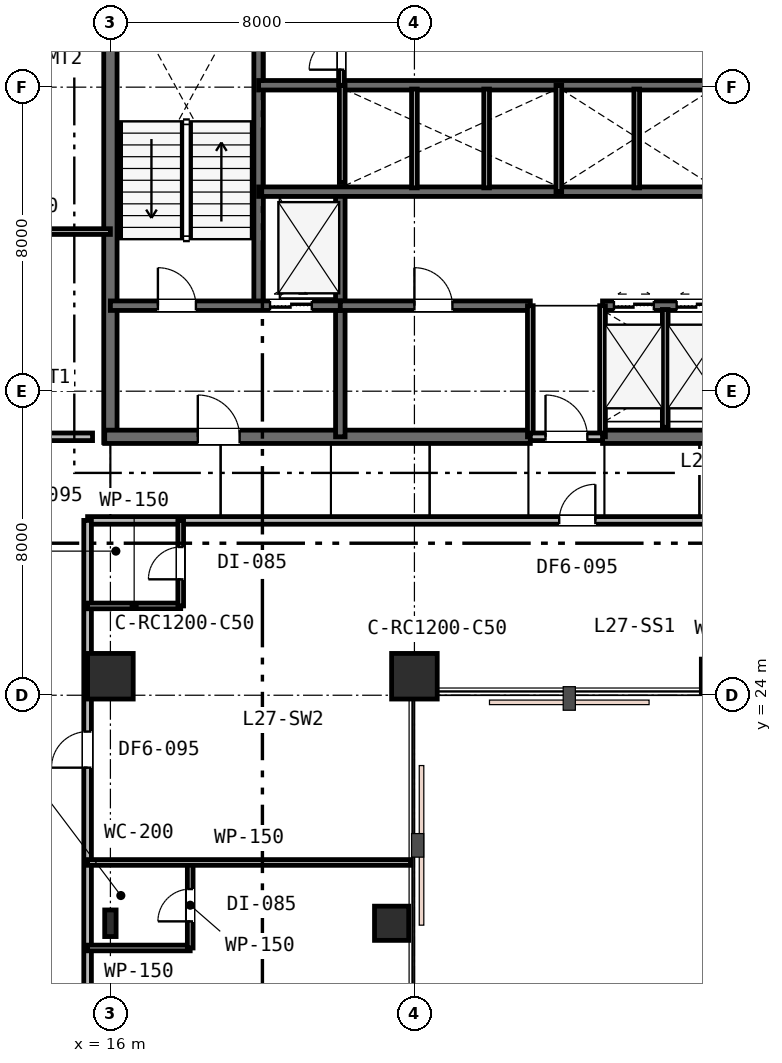
"""IFC4 building model, lengths in metres.
Left out: names, types, materials, properties, quantities, classifications, styles, units other than length and angle.
Written with IfcOpenShell. Run it as: python <this file> out.ifc"""

import sys

from ifc_helpers import new_model, si_unit, direction, frame, frame_2d, origin, origin_2d, place, context, subcontext, project, spatial, rectangle, i_section, extrude, element, fill, save


model = new_model("IFC4")
c1 = context("Model", 3, precision=1e-05, world=origin(), true_north=direction((0.0, 1.0)))
c2 = subcontext(c1, "Body", "Model", "MODEL_VIEW")
j1 = project(units=[si_unit("LENGTHUNIT", "METRE"), si_unit("PLANEANGLEUNIT", "RADIAN")], contexts=[c1])
p1 = place(None, origin())
s1 = spatial("IfcSite", under=j1, at=p1, CompositionType="ELEMENT")
p2 = place(p1, origin())
s2 = spatial("IfcBuilding", under=s1, at=p2, CompositionType="ELEMENT")
p3 = place(p2, frame((0.0, 0.0, 108.0)))
s3 = spatial("IfcBuildingStorey", under=s2, at=p3, CompositionType="ELEMENT", Elevation=108.0)
p4 = place(p3, frame((16.0, 30.65, 0.0), z_axis=(0.0, 0.0, 1.0), x_axis=(0.0, 1.0, 0.0)))
e1 = element("IfcWall", 1, at=p4, inside=s3, PredefinedType="SHEAR", context=c2, shape_type="SweptSolid", body=[
    extrude(rectangle(XDim=12.3, YDim=0.35, at=frame_2d((6.15, 0.0))), origin(), (0.0, 0.0, 1.0), 3.6),
])
p5 = place(p3, frame((15.85, 30.8, 0.0), z_axis=(0.0, 0.0, 1.0), x_axis=(1.0, 0.0, 0.0)))
e2 = element("IfcWall", 2, at=p5, inside=s3, PredefinedType="SHEAR", context=c2, shape_type="SweptSolid", body=[
    extrude(rectangle(XDim=11.2, YDim=0.35, at=frame_2d((5.6, 0.0))), origin(), (0.0, 0.0, 1.0), 3.6),
])
p6 = place(p5, frame((2.45, 0.0, 0.0)))
e3 = element("IfcOpeningElement", 3, at=p6, cuts=e2, PredefinedType="OPENING", context=c2, shape_type="SweptSolid", body=[
    extrude(rectangle(XDim=1.1, YDim=2.15, at=frame_2d((0.55, 1.075))), frame((0.0, 0.185, 0.0), z_axis=(0.0, -1.0, 0.0), x_axis=(1.0, 0.0, 0.0)), (0.0, 0.0, 1.0), 0.37),
])
p7 = place(p3, frame((28.95, 30.8, 0.0), z_axis=(0.0, 0.0, 1.0), x_axis=(1.0, 0.0, 0.0)))
e4 = element("IfcWall", 4, at=p7, inside=s3, PredefinedType="SHEAR", context=c2, shape_type="SweptSolid", body=[
    extrude(rectangle(XDim=11.2, YDim=0.35, at=frame_2d((5.6, 0.0))), origin(), (0.0, 0.0, 1.0), 3.6),
])
p8 = place(p7, frame((7.65, 0.0, 0.0)))
e5 = element("IfcOpeningElement", 5, at=p8, cuts=e4, PredefinedType="OPENING", context=c2, shape_type="SweptSolid", body=[
    extrude(rectangle(XDim=1.1, YDim=2.15, at=frame_2d((0.55, 1.075))), frame((0.0, 0.185, 0.0), z_axis=(0.0, -1.0, 0.0), x_axis=(1.0, 0.0, 0.0)), (0.0, 0.0, 1.0), 0.37),
])
p9 = place(p3, frame((19.9, 34.25, 0.0), z_axis=(0.0, 0.0, 1.0), x_axis=(0.0, 1.0, 0.0)))
e6 = element("IfcWall", 6, at=p9, inside=s3, PredefinedType="SHEAR", context=c2, shape_type="SweptSolid", body=[
    extrude(rectangle(XDim=8.65, YDim=0.25, at=frame_2d((4.325, 0.0))), origin(), (0.0, 0.0, 1.0), 3.6),
])
p10 = place(p3, frame((22.05, 30.8, 0.0), z_axis=(0.0, 0.0, 1.0), x_axis=(0.0, 1.0, 0.0)))
e7 = element("IfcWall", 7, at=p10, inside=s3, PredefinedType="SHEAR", context=c2, shape_type="SweptSolid", body=[
    extrude(rectangle(XDim=6.45, YDim=0.25, at=frame_2d((3.225, 0.0))), origin(), (0.0, 0.0, 1.0), 3.6),
])
p11 = place(p3, frame((16.0, 34.25, 0.0), z_axis=(0.0, 0.0, 1.0), x_axis=(1.0, 0.0, 0.0)))
e8 = element("IfcWall", 8, at=p11, inside=s3, PredefinedType="SHEAR", context=c2, shape_type="SweptSolid", body=[
    extrude(rectangle(XDim=6.05, YDim=0.25, at=frame_2d((3.025, 0.0))), origin(), (0.0, 0.0, 1.0), 3.6),
])
p12 = place(p11, frame((1.25, 0.0, 0.0)))
e9 = element("IfcOpeningElement", 9, at=p12, cuts=e8, PredefinedType="OPENING", context=c2, shape_type="SweptSolid", body=[
    extrude(rectangle(XDim=1.0, YDim=2.15, at=frame_2d((0.5, 1.075))), frame((0.0, 0.135, 0.0), z_axis=(0.0, -1.0, 0.0), x_axis=(1.0, 0.0, 0.0)), (0.0, 0.0, 1.0), 0.27),
])
p13 = place(p11, frame((4.2, 0.0, 0.0)))
e10 = element("IfcOpeningElement", 10, at=p13, cuts=e8, PredefinedType="OPENING", context=c2, shape_type="SweptSolid", body=[
    extrude(rectangle(XDim=1.1, YDim=2.15, at=frame_2d((0.55, 1.075))), frame((0.0, 0.135, 0.0), z_axis=(0.0, -1.0, 0.0), x_axis=(1.0, 0.0, 0.0)), (0.0, 0.0, 1.0), 0.27),
])
p14 = place(p3, frame((22.05, 34.25, 0.0), z_axis=(0.0, 0.0, 1.0), x_axis=(1.0, 0.0, 0.0)))
e11 = element("IfcWall", 11, at=p14, inside=s3, PredefinedType="SHEAR", context=c2, shape_type="SweptSolid", body=[
    extrude(rectangle(XDim=5.0, YDim=0.25, at=frame_2d((2.5, 0.0))), origin(), (0.0, 0.0, 1.0), 3.6),
])
p15 = place(p14, frame((1.95, 0.0, 0.0)))
e12 = element("IfcOpeningElement", 12, at=p15, cuts=e11, PredefinedType="OPENING", context=c2, shape_type="SweptSolid", body=[
    extrude(rectangle(XDim=1.0, YDim=2.15, at=frame_2d((0.5, 1.075))), frame((0.0, 0.135, 0.0), z_axis=(0.0, -1.0, 0.0), x_axis=(1.0, 0.0, 0.0)), (0.0, 0.0, 1.0), 0.27),
])
p16 = place(p3, frame((28.95, 34.25, 0.0), z_axis=(0.0, 0.0, 1.0), x_axis=(1.0, 0.0, 0.0)))
e13 = element("IfcWall", 13, at=p16, inside=s3, PredefinedType="SHEAR", context=c2, shape_type="SweptSolid", body=[
    extrude(rectangle(XDim=5.0, YDim=0.25, at=frame_2d((2.5, 0.0))), origin(), (0.0, 0.0, 1.0), 3.6),
])
p17 = place(p16, frame((0.3, 0.0, 0.0)))
e14 = element("IfcOpeningElement", 14, at=p17, cuts=e13, PredefinedType="OPENING", context=c2, shape_type="SweptSolid", body=[
    extrude(rectangle(XDim=1.05, YDim=2.15, at=frame_2d((0.525, 1.075))), frame((0.0, 0.135, 0.0), z_axis=(0.0, -1.0, 0.0), x_axis=(1.0, 0.0, 0.0)), (0.0, 0.0, 1.0), 0.27),
])
p18 = place(p16, frame((1.95, 0.0, 0.0)))
e15 = element("IfcOpeningElement", 15, at=p18, cuts=e13, PredefinedType="OPENING", context=c2, shape_type="SweptSolid", body=[
    extrude(rectangle(XDim=1.05, YDim=2.15, at=frame_2d((0.525, 1.075))), frame((0.0, 0.135, 0.0), z_axis=(0.0, -1.0, 0.0), x_axis=(1.0, 0.0, 0.0)), (0.0, 0.0, 1.0), 0.27),
])
p19 = place(p16, frame((3.6, 0.0, 0.0)))
e16 = element("IfcOpeningElement", 16, at=p19, cuts=e13, PredefinedType="OPENING", context=c2, shape_type="SweptSolid", body=[
    extrude(rectangle(XDim=1.05, YDim=2.15, at=frame_2d((0.525, 1.075))), frame((0.0, 0.135, 0.0), z_axis=(0.0, -1.0, 0.0), x_axis=(1.0, 0.0, 0.0)), (0.0, 0.0, 1.0), 0.27),
])
p20 = place(p3, frame((19.9, 37.25, 0.0), z_axis=(0.0, 0.0, 1.0), x_axis=(1.0, 0.0, 0.0)))
e17 = element("IfcWall", 17, at=p20, inside=s3, PredefinedType="SHEAR", context=c2, shape_type="SweptSolid", body=[
    extrude(rectangle(XDim=16.2, YDim=0.25, at=frame_2d((8.1, 0.0))), origin(), (0.0, 0.0, 1.0), 3.6),
])
p21 = place(p20, frame((12.55, 0.0, 0.0)))
e18 = element("IfcOpeningElement", 18, at=p21, cuts=e17, PredefinedType="OPENING", context=c2, shape_type="SweptSolid", body=[
    extrude(rectangle(XDim=0.9, YDim=2.15, at=frame_2d((0.45, 1.075))), frame((0.0, 0.135, 0.0), z_axis=(0.0, -1.0, 0.0), x_axis=(1.0, 0.0, 0.0)), (0.0, 0.0, 1.0), 0.27),
])
p22 = place(p3, frame((19.9, 40.05, 0.0), z_axis=(0.0, 0.0, 1.0), x_axis=(1.0, 0.0, 0.0)))
e19 = element("IfcWall", 19, at=p22, inside=s3, PredefinedType="SHEAR", context=c2, shape_type="SweptSolid", body=[
    extrude(rectangle(XDim=12.05, YDim=0.25, at=frame_2d((6.025, 0.0))), origin(), (0.0, 0.0, 1.0), 3.6),
])
for number, where, z_axis, x_axis in (
    (20, (16.0, 24.5, 0.0), (0.0, 0.0, 1.0), (1.0, 0.0, 0.0)),
    (21, (24.0, 24.5, 0.0), (0.0, 0.0, 1.0), (1.0, 0.0, 0.0)),
):
    element("IfcColumn", number, at=place(p3, frame(where, z_axis=z_axis, x_axis=x_axis)), inside=s3, PredefinedType="COLUMN", context=c2, shape_type="SweptSolid", body=[
        extrude(rectangle(XDim=1.2, YDim=1.2, at=origin_2d()), origin(), (0.0, 0.0, 1.0), 3.6),
    ])
for number, where, z_axis, x_axis in (
    (22, (32.0, 24.5, 0.0), (0.0, 0.0, 1.0), (1.0, 0.0, 0.0)),
    (23, (23.4, 18.0, 0.0), (0.0, 0.0, 1.0), (1.0, 0.0, 0.0)),
):
    element("IfcColumn", number, at=place(p3, frame(where, z_axis=z_axis, x_axis=x_axis)), inside=s3, PredefinedType="COLUMN", context=c2, shape_type="SweptSolid", body=[
        extrude(rectangle(XDim=0.9, YDim=0.9, at=origin_2d()), origin(), (0.0, 0.0, 1.0), 3.6),
    ])
p23 = place(p3, frame((16.0, 18.0, 0.0), z_axis=(0.0, 0.0, 1.0), x_axis=(1.0, 0.0, 0.0)))
e24 = element("IfcColumn", 24, at=p23, inside=s3, PredefinedType="COLUMN", context=c2, shape_type="SweptSolid", body=[
    extrude(i_section(OverallWidth=0.3, OverallDepth=0.7, WebThickness=0.017, FlangeThickness=0.032, FilletRadius=0.027, at=origin_2d()), origin(), (0.0, 0.0, 1.0), 3.6),
])
p24 = place(p3, frame((27.05, 30.8, 0.0), z_axis=(0.0, 0.0, 1.0), x_axis=(0.0, 1.0, 0.0)))
e25 = element("IfcWall", 25, at=p24, inside=s3, PredefinedType="PLUMBINGWALL", context=c2, shape_type="SweptSolid", body=[
    extrude(rectangle(XDim=3.45, YDim=0.15, at=frame_2d((1.725, 0.0))), origin(), (0.0, 0.0, 1.0), 3.01),
])
p25 = place(p3, frame((28.95, 30.8, 0.0), z_axis=(0.0, 0.0, 1.0), x_axis=(0.0, 1.0, 0.0)))
e26 = element("IfcWall", 26, at=p25, inside=s3, PredefinedType="PLUMBINGWALL", context=c2, shape_type="SweptSolid", body=[
    extrude(rectangle(XDim=3.45, YDim=0.15, at=frame_2d((1.725, 0.0))), origin(), (0.0, 0.0, 1.0), 3.33),
])
p26 = place(p3, frame((27.05, 30.8, 0.0), z_axis=(0.0, 0.0, 1.0), x_axis=(1.0, 0.0, 0.0)))
e27 = element("IfcWall", 27, at=p26, inside=s3, PredefinedType="PARTITIONING", context=c2, shape_type="SweptSolid", body=[
    extrude(rectangle(XDim=1.9, YDim=0.2, at=frame_2d((0.95, 0.0))), origin(), (0.0, 0.0, 1.0), 3.01),
])
p27 = place(p26, frame((0.4, 0.0, 0.0)))
e28 = element("IfcOpeningElement", 28, at=p27, cuts=e27, PredefinedType="OPENING", context=c2, shape_type="SweptSolid", body=[
    extrude(rectangle(XDim=1.1, YDim=2.15, at=frame_2d((0.55, 1.075))), frame((0.0, 0.11, 0.0), z_axis=(0.0, -1.0, 0.0), x_axis=(1.0, 0.0, 0.0)), (0.0, 0.0, 1.0), 0.22),
])
p28 = place(p3, frame((30.6, 31.05, 0.0), z_axis=(0.0, 0.0, 1.0), x_axis=(0.0, 1.0, 0.0)))
e29 = element("IfcWall", 29, at=p28, inside=s3, PredefinedType="PLUMBINGWALL", context=c2, shape_type="SweptSolid", body=[
    extrude(rectangle(XDim=3.1, YDim=0.15, at=frame_2d((1.55, 0.0))), origin(), (0.0, 0.0, 1.0), 3.33),
])
p29 = place(p3, frame((22.1, 37.49, 0.0), z_axis=(0.0, 0.0, 1.0), x_axis=(0.0, 1.0, 0.0)))
e30 = element("IfcWall", 30, at=p29, inside=s3, PredefinedType="PLUMBINGWALL", context=c2, shape_type="SweptSolid", body=[
    extrude(rectangle(XDim=2.56, YDim=0.15, at=frame_2d((1.28, 0.0))), origin(), (0.0, 0.0, 1.0), 3.33),
])
p30 = place(p3, frame((27.8, 37.25, 0.0), z_axis=(0.0, 0.0, 1.0), x_axis=(0.0, 1.0, 0.0)))
e31 = element("IfcWall", 31, at=p30, inside=s3, PredefinedType="PLUMBINGWALL", context=c2, shape_type="SweptSolid", body=[
    extrude(rectangle(XDim=2.8, YDim=0.15, at=frame_2d((1.4, 0.0))), origin(), (0.0, 0.0, 1.0), 3.33),
])
for number, where, z_axis, x_axis in (
    (32, (24.0, 37.35, 0.0), (0.0, 0.0, 1.0), (0.0, 1.0, 0.0)),
    (33, (25.9, 37.35, 0.0), (0.0, 0.0, 1.0), (0.0, 1.0, 0.0)),
    (34, (29.85, 37.35, 0.0), (0.0, 0.0, 1.0), (0.0, 1.0, 0.0)),
):
    element("IfcWall", number, at=place(p3, frame(where, z_axis=z_axis, x_axis=x_axis)), inside=s3, PredefinedType="PLUMBINGWALL", context=c2, shape_type="SweptSolid", body=[
        extrude(rectangle(XDim=2.6, YDim=0.15, at=frame_2d((1.3, 0.0))), origin(), (0.0, 0.0, 1.0), 3.33),
    ])
p31 = place(p3, frame((22.08, 40.05, 0.0), z_axis=(0.0, 0.0, 1.0), x_axis=(0.0, 1.0, 0.0)))
e35 = element("IfcWall", 35, at=p31, inside=s3, PredefinedType="PARTITIONING", context=c2, shape_type="SweptSolid", body=[
    extrude(rectangle(XDim=2.63, YDim=0.15, at=frame_2d((1.315, 0.0))), origin(), (0.0, 0.0, 1.0), 3.33),
])
p32 = place(p31, frame((0.41, 0.0, 0.0)))
e36 = element("IfcOpeningElement", 36, at=p32, cuts=e35, PredefinedType="OPENING", context=c2, shape_type="SweptSolid", body=[
    extrude(rectangle(XDim=0.85, YDim=2.15, at=frame_2d((0.425, 1.075))), frame((0.0, 0.085, 0.0), z_axis=(0.0, -1.0, 0.0), x_axis=(1.0, 0.0, 0.0)), (0.0, 0.0, 1.0), 0.17),
])
p33 = place(p3, frame((15.4, 28.6, 0.0), z_axis=(0.0, 0.0, 1.0), x_axis=(1.0, 0.0, 0.0)))
e37 = element("IfcWall", 37, at=p33, inside=s3, PredefinedType="PARTITIONING", context=c2, shape_type="SweptSolid", body=[
    extrude(rectangle(XDim=28.8, YDim=0.2, at=frame_2d((14.4, 0.0))), origin(), (0.0, 0.0, 1.0), 2.87),
])
p34 = place(p33, frame((12.41, 0.0, 0.0)))
e38 = element("IfcOpeningElement", 38, at=p34, cuts=e37, PredefinedType="OPENING", context=c2, shape_type="SweptSolid", body=[
    extrude(rectangle(XDim=0.95, YDim=2.15, at=frame_2d((0.475, 1.075))), frame((0.0, 0.11, 0.0), z_axis=(0.0, -1.0, 0.0), x_axis=(1.0, 0.0, 0.0)), (0.0, 0.0, 1.0), 0.22),
])
p35 = place(p33, frame((22.68, 0.0, 0.0)))
e39 = element("IfcOpeningElement", 39, at=p35, cuts=e37, PredefinedType="OPENING", context=c2, shape_type="SweptSolid", body=[
    extrude(rectangle(XDim=0.95, YDim=2.15, at=frame_2d((0.475, 1.075))), frame((0.0, 0.11, 0.0), z_axis=(0.0, -1.0, 0.0), x_axis=(1.0, 0.0, 0.0)), (0.0, 0.0, 1.0), 0.22),
])
p36 = place(p3, frame((11.4, 30.8, 0.0), z_axis=(0.0, 0.0, 1.0), x_axis=(1.0, 0.0, 0.0)))
e40 = element("IfcWall", 40, at=p36, inside=s3, PredefinedType="PARTITIONING", context=c2, shape_type="SweptSolid", body=[
    extrude(rectangle(XDim=4.13, YDim=0.2, at=frame_2d((2.065, 0.0))), origin(), (0.0, 0.0, 1.0), 2.87),
])
p37 = place(p3, frame((11.4, 36.2, 0.0), z_axis=(0.0, 0.0, 1.0), x_axis=(1.0, 0.0, 0.0)))
e41 = element("IfcWall", 41, at=p37, inside=s3, PredefinedType="PARTITIONING", context=c2, shape_type="SweptSolid", body=[
    extrude(rectangle(XDim=4.6, YDim=0.15, at=frame_2d((2.3, 0.0))), origin(), (0.0, 0.0, 1.0), 3.33),
])
p38 = place(p3, frame((15.4, 10.6, 0.0), z_axis=(0.0, 0.0, 1.0), x_axis=(0.0, 1.0, 0.0)))
e42 = element("IfcWall", 42, at=p38, inside=s3, PredefinedType="PARTITIONING", context=c2, shape_type="SweptSolid", body=[
    extrude(rectangle(XDim=18.0, YDim=0.2, at=frame_2d((9.0, 0.0))), origin(), (0.0, 0.0, 1.0), 2.87),
])
p39 = place(p38, frame((4.24, 0.0, 0.0)))
e43 = element("IfcOpeningElement", 43, at=p39, cuts=e42, PredefinedType="OPENING", context=c2, shape_type="SweptSolid", body=[
    extrude(rectangle(XDim=0.95, YDim=2.15, at=frame_2d((0.475, 1.075))), frame((0.0, 0.11, 0.0), z_axis=(0.0, -1.0, 0.0), x_axis=(1.0, 0.0, 0.0)), (0.0, 0.0, 1.0), 0.22),
])
p40 = place(p38, frame((11.494, 0.0, 0.0)))
e44 = element("IfcOpeningElement", 44, at=p40, cuts=e42, PredefinedType="OPENING", context=c2, shape_type="SweptSolid", body=[
    extrude(rectangle(XDim=0.95, YDim=2.15, at=frame_2d((0.475, 1.075))), frame((0.0, 0.11, 0.0), z_axis=(0.0, -1.0, 0.0), x_axis=(1.0, 0.0, 0.0)), (0.0, 0.0, 1.0), 0.22),
])
p41 = place(p3, frame((15.4, 17.35, 0.0), z_axis=(0.0, 0.0, 1.0), x_axis=(1.0, 0.0, 0.0)))
e45 = element("IfcWall", 45, at=p41, inside=s3, PredefinedType="PARTITIONING", context=c2, shape_type="SweptSolid", body=[
    extrude(rectangle(XDim=2.7, YDim=0.15, at=frame_2d((1.35, 0.0))), origin(), (0.0, 0.0, 1.0), 2.87),
])
p42 = place(p3, frame((18.1, 17.35, 0.0), z_axis=(0.0, 0.0, 1.0), x_axis=(0.0, 1.0, 0.0)))
e46 = element("IfcWall", 46, at=p42, inside=s3, PredefinedType="PARTITIONING", context=c2, shape_type="SweptSolid", body=[
    extrude(rectangle(XDim=2.25, YDim=0.15, at=frame_2d((1.125, 0.0))), origin(), (0.0, 0.0, 1.0), 2.87),
])
p43 = place(p42, frame((0.7, 0.0, 0.0)))
e47 = element("IfcOpeningElement", 47, at=p43, cuts=e46, PredefinedType="OPENING", context=c2, shape_type="SweptSolid", body=[
    extrude(rectangle(XDim=0.85, YDim=2.15, at=frame_2d((0.425, 1.075))), frame((0.0, 0.085, 0.0), z_axis=(0.0, -1.0, 0.0), x_axis=(1.0, 0.0, 0.0)), (0.0, 0.0, 1.0), 0.17),
])
p44 = place(p3, frame((15.4, 19.6, 0.0), z_axis=(0.0, 0.0, 1.0), x_axis=(1.0, 0.0, 0.0)))
e48 = element("IfcWall", 48, at=p44, inside=s3, PredefinedType="PARTITIONING", context=c2, shape_type="SweptSolid", body=[
    extrude(rectangle(XDim=8.5, YDim=0.15, at=frame_2d((4.25, 0.0))), origin(), (0.0, 0.0, 1.0), 2.87),
])
p45 = place(p3, frame((15.4, 26.35, 0.0), z_axis=(0.0, 0.0, 1.0), x_axis=(1.0, 0.0, 0.0)))
e49 = element("IfcWall", 49, at=p45, inside=s3, PredefinedType="PARTITIONING", context=c2, shape_type="SweptSolid", body=[
    extrude(rectangle(XDim=2.45, YDim=0.15, at=frame_2d((1.225, 0.0))), origin(), (0.0, 0.0, 1.0), 2.87),
])
p46 = place(p3, frame((17.85, 26.35, 0.0), z_axis=(0.0, 0.0, 1.0), x_axis=(0.0, 1.0, 0.0)))
e50 = element("IfcWall", 50, at=p46, inside=s3, PredefinedType="PARTITIONING", context=c2, shape_type="SweptSolid", body=[
    extrude(rectangle(XDim=2.25, YDim=0.15, at=frame_2d((1.125, 0.0))), origin(), (0.0, 0.0, 1.0), 3.33),
])
p47 = place(p46, frame((0.7, 0.0, 0.0)))
e51 = element("IfcOpeningElement", 51, at=p47, cuts=e50, PredefinedType="OPENING", context=c2, shape_type="SweptSolid", body=[
    extrude(rectangle(XDim=0.85, YDim=2.15, at=frame_2d((0.425, 1.075))), frame((0.0, 0.085, 0.0), z_axis=(0.0, -1.0, 0.0), x_axis=(1.0, 0.0, 0.0)), (0.0, 0.0, 1.0), 0.17),
])
p48 = place(p27, origin())
e52 = element("IfcDoor", 52, at=p48, inside=s3, OperationType="SINGLE_SWING_LEFT", PredefinedType="DOOR", context=c2, shape_type="SweptSolid", body=[
    extrude(rectangle(XDim=1.1, YDim=2.15, at=frame_2d((0.55, 1.075))), frame((0.0, 0.025, 0.0), z_axis=(0.0, -1.0, 0.0), x_axis=(1.0, 0.0, 0.0)), (0.0, 0.0, 1.0), 0.05),
])
fill(e28, e52)
p49 = place(p12, origin())
e53 = element("IfcDoor", 53, at=p49, inside=s3, OperationType="SINGLE_SWING_LEFT", PredefinedType="DOOR", context=c2, shape_type="SweptSolid", body=[
    extrude(rectangle(XDim=1.0, YDim=2.15, at=frame_2d((0.5, 1.075))), frame((0.0, 0.025, 0.0), z_axis=(0.0, -1.0, 0.0), x_axis=(1.0, 0.0, 0.0)), (0.0, 0.0, 1.0), 0.05),
])
fill(e9, e53)
p50 = place(p6, origin())
e54 = element("IfcDoor", 54, at=p50, inside=s3, OperationType="SINGLE_SWING_LEFT", PredefinedType="DOOR", context=c2, shape_type="SweptSolid", body=[
    extrude(rectangle(XDim=1.1, YDim=2.15, at=frame_2d((0.55, 1.075))), frame((0.0, 0.025, 0.0), z_axis=(0.0, -1.0, 0.0), x_axis=(1.0, 0.0, 0.0)), (0.0, 0.0, 1.0), 0.05),
])
fill(e3, e54)
p51 = place(p15, origin())
e55 = element("IfcDoor", 55, at=p51, inside=s3, OperationType="SINGLE_SWING_LEFT", PredefinedType="DOOR", context=c2, shape_type="SweptSolid", body=[
    extrude(rectangle(XDim=1.0, YDim=2.15, at=frame_2d((0.5, 1.075))), frame((0.0, 0.025, 0.0), z_axis=(0.0, -1.0, 0.0), x_axis=(1.0, 0.0, 0.0)), (0.0, 0.0, 1.0), 0.05),
])
fill(e12, e55)
p52 = place(p32, origin())
e56 = element("IfcDoor", 56, at=p52, inside=s3, OperationType="SINGLE_SWING_LEFT", PredefinedType="DOOR", context=c2, shape_type="SweptSolid", body=[
    extrude(rectangle(XDim=0.85, YDim=2.15, at=frame_2d((0.425, 1.075))), frame((0.0, 0.025, 0.0), z_axis=(0.0, -1.0, 0.0), x_axis=(1.0, 0.0, 0.0)), (0.0, 0.0, 1.0), 0.05),
])
fill(e36, e56)
p53 = place(p43, origin())
e57 = element("IfcDoor", 57, at=p53, inside=s3, OperationType="SINGLE_SWING_LEFT", PredefinedType="DOOR", context=c2, shape_type="SweptSolid", body=[
    extrude(rectangle(XDim=0.85, YDim=2.15, at=frame_2d((0.425, 1.075))), frame((0.0, 0.025, 0.0), z_axis=(0.0, -1.0, 0.0), x_axis=(1.0, 0.0, 0.0)), (0.0, 0.0, 1.0), 0.05),
])
fill(e47, e57)
p54 = place(p40, origin())
e58 = element("IfcDoor", 58, at=p54, inside=s3, OperationType="SINGLE_SWING_LEFT", PredefinedType="DOOR", context=c2, shape_type="SweptSolid", body=[
    extrude(rectangle(XDim=0.95, YDim=2.15, at=frame_2d((0.475, 1.075))), frame((0.0, 0.025, 0.0), z_axis=(0.0, -1.0, 0.0), x_axis=(1.0, 0.0, 0.0)), (0.0, 0.0, 1.0), 0.05),
])
fill(e44, e58)
p55 = place(p47, origin())
e59 = element("IfcDoor", 59, at=p55, inside=s3, OperationType="SINGLE_SWING_LEFT", PredefinedType="DOOR", context=c2, shape_type="SweptSolid", body=[
    extrude(rectangle(XDim=0.85, YDim=2.15, at=frame_2d((0.425, 1.075))), frame((0.0, 0.025, 0.0), z_axis=(0.0, -1.0, 0.0), x_axis=(1.0, 0.0, 0.0)), (0.0, 0.0, 1.0), 0.05),
])
fill(e51, e59)
p56 = place(p34, origin())
e60 = element("IfcDoor", 60, at=p56, inside=s3, OperationType="SINGLE_SWING_RIGHT", PredefinedType="DOOR", context=c2, shape_type="SweptSolid", body=[
    extrude(rectangle(XDim=0.95, YDim=2.15, at=frame_2d((0.475, 1.075))), frame((0.0, 0.025, 0.0), z_axis=(0.0, -1.0, 0.0), x_axis=(1.0, 0.0, 0.0)), (0.0, 0.0, 1.0), 0.05),
])
fill(e38, e60)
p57 = place(p13, origin())
e61 = element("IfcDoor", 61, at=p57, inside=s3, OperationType="DOUBLE_DOOR_SLIDING", PredefinedType="DOOR", context=c2, shape_type="SweptSolid", body=[
    extrude(rectangle(XDim=1.1, YDim=2.15, at=frame_2d((0.55, 1.075))), frame((0.0, 0.025, 0.0), z_axis=(0.0, -1.0, 0.0), x_axis=(1.0, 0.0, 0.0)), (0.0, 0.0, 1.0), 0.05),
])
fill(e10, e61)
p58 = place(p17, origin())
e62 = element("IfcDoor", 62, at=p58, inside=s3, OperationType="DOUBLE_DOOR_SLIDING", PredefinedType="DOOR", context=c2, shape_type="SweptSolid", body=[
    extrude(rectangle(XDim=1.05, YDim=2.15, at=frame_2d((0.525, 1.075))), frame((0.0, 0.025, 0.0), z_axis=(0.0, -1.0, 0.0), x_axis=(1.0, 0.0, 0.0)), (0.0, 0.0, 1.0), 0.05),
])
fill(e14, e62)
p59 = place(p18, origin())
e63 = element("IfcDoor", 63, at=p59, inside=s3, OperationType="DOUBLE_DOOR_SLIDING", PredefinedType="DOOR", context=c2, shape_type="SweptSolid", body=[
    extrude(rectangle(XDim=1.05, YDim=2.15, at=frame_2d((0.525, 1.075))), frame((0.0, 0.025, 0.0), z_axis=(0.0, -1.0, 0.0), x_axis=(1.0, 0.0, 0.0)), (0.0, 0.0, 1.0), 0.05),
])
fill(e15, e63)
save(model, sys.argv[1])
